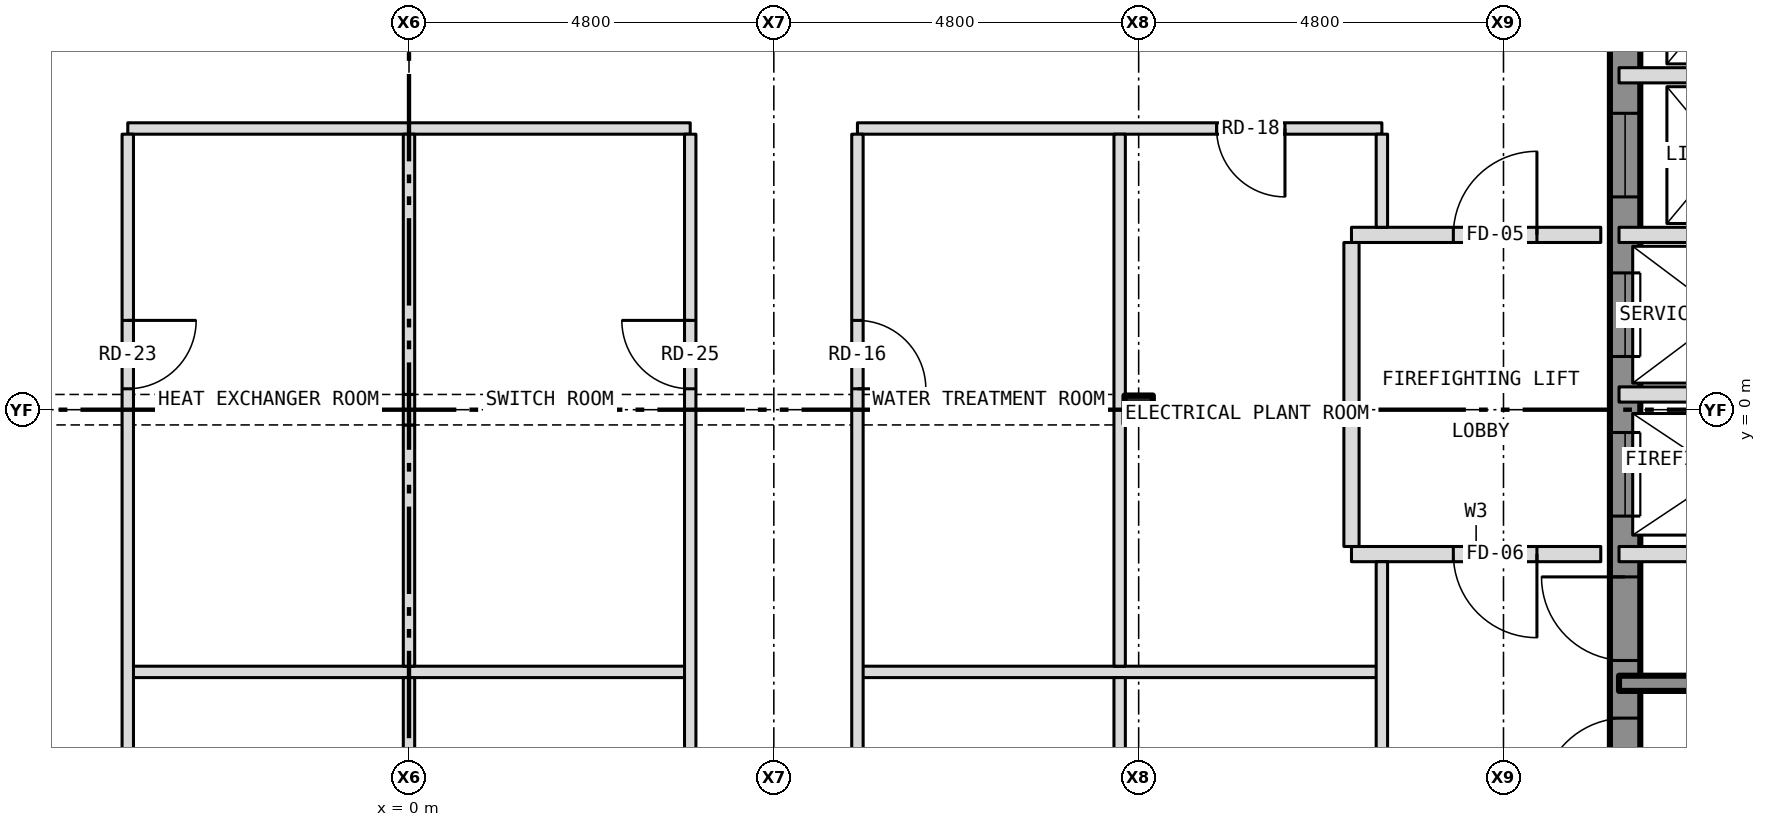
"""IFC4 building model, lengths in metres.
Left out: names, types, materials, properties, quantities, classifications, styles, units other than length and angle.
Written with IfcOpenShell. Run it as: python <this file> out.ifc"""

import sys

from ifc_helpers import new_model, si_unit, direction, frame, frame_2d, origin, origin_2d, place, context, subcontext, project, spatial, rectangle, i_section, extrude, element, fill, save


model = new_model("IFC4")
c1 = context("Model", 3, precision=1e-05, world=origin(), true_north=direction((0.0, 1.0)))
c2 = subcontext(c1, "Body", "Model", "MODEL_VIEW")
j1 = project(units=[si_unit("LENGTHUNIT", "METRE"), si_unit("PLANEANGLEUNIT", "RADIAN")], contexts=[c1])
p1 = place(None, origin())
s1 = spatial("IfcSite", under=j1, at=p1, CompositionType="ELEMENT")
p2 = place(p1, origin())
s2 = spatial("IfcBuilding", under=s1, at=p2, CompositionType="ELEMENT")
p3 = place(p2, frame((0.0, 0.0, 236.5)))
s3 = spatial("IfcBuildingStorey", under=s2, at=p3, CompositionType="ELEMENT", Elevation=236.5)
p4 = place(p3, frame((9.6, 0.0, -0.3), z_axis=(0.0, 0.0, 1.0), x_axis=(1.0, 0.0, 0.0)))
e1 = element("IfcColumn", 1, at=p4, inside=s3, PredefinedType="COLUMN", context=c2, shape_type="SweptSolid", body=[
    extrude(i_section(OverallWidth=0.373, OverallDepth=0.373, WebThickness=0.016, FlangeThickness=0.026, at=origin_2d()), origin(), (0.0, 0.0, 1.0), 4.65),
])
p5 = place(p3, frame((16.0, -10.8, 0.0), z_axis=(0.0, 0.0, 1.0), x_axis=(0.0, 1.0, 0.0)))
e2 = element("IfcWall", 2, at=p5, inside=s3, PredefinedType="SHEAR", context=c2, shape_type="SweptSolid", body=[
    extrude(rectangle(XDim=21.6, YDim=0.4, at=frame_2d((10.8, 0.0))), origin(), (0.0, 0.0, 1.0), 3.9),
])
p6 = place(p5, frame((9.4, 0.0, 0.0)))
e3 = element("IfcOpeningElement", 3, at=p6, cuts=e2, PredefinedType="OPENING", context=c2, shape_type="SweptSolid", body=[
    extrude(rectangle(XDim=1.1, YDim=2.1, at=frame_2d((0.55, 1.05))), frame((0.0, 0.212, 0.0), z_axis=(0.0, -1.0, 0.0), x_axis=(1.0, 0.0, 0.0)), (0.0, 0.0, 1.0), 0.424),
])
p7 = place(p5, frame((11.5, 0.0, 0.0)))
e4 = element("IfcOpeningElement", 4, at=p7, cuts=e2, PredefinedType="OPENING", context=c2, shape_type="SweptSolid", body=[
    extrude(rectangle(XDim=1.1, YDim=2.1, at=frame_2d((0.55, 1.05))), frame((0.0, 0.212, 0.0), z_axis=(0.0, -1.0, 0.0), x_axis=(1.0, 0.0, 0.0)), (0.0, 0.0, 1.0), 0.424),
])
p8 = place(p5, frame((13.6, 0.0, 0.0)))
e5 = element("IfcOpeningElement", 5, at=p8, cuts=e2, PredefinedType="OPENING", context=c2, shape_type="SweptSolid", body=[
    extrude(rectangle(XDim=1.1, YDim=2.1, at=frame_2d((0.55, 1.05))), frame((0.0, 0.212, 0.0), z_axis=(0.0, -1.0, 0.0), x_axis=(1.0, 0.0, 0.0)), (0.0, 0.0, 1.0), 0.424),
])
p9 = place(p5, frame((15.7, 0.0, 0.0)))
e6 = element("IfcOpeningElement", 6, at=p9, cuts=e2, PredefinedType="OPENING", context=c2, shape_type="SweptSolid", body=[
    extrude(rectangle(XDim=1.1, YDim=2.1, at=frame_2d((0.55, 1.05))), frame((0.0, 0.212, 0.0), z_axis=(0.0, -1.0, 0.0), x_axis=(1.0, 0.0, 0.0)), (0.0, 0.0, 1.0), 0.424),
])
p10 = place(p5, frame((17.8, 0.0, 0.0)))
e7 = element("IfcOpeningElement", 7, at=p10, cuts=e2, PredefinedType="OPENING", context=c2, shape_type="SweptSolid", body=[
    extrude(rectangle(XDim=1.1, YDim=2.1, at=frame_2d((0.55, 1.05))), frame((0.0, 0.212, 0.0), z_axis=(0.0, -1.0, 0.0), x_axis=(1.0, 0.0, 0.0)), (0.0, 0.0, 1.0), 0.424),
])
p11 = place(p5, frame((5.642, 0.0, 0.0)))
e8 = element("IfcOpeningElement", 8, at=p11, cuts=e2, PredefinedType="OPENING", context=c2, shape_type="SweptSolid", body=[
    extrude(rectangle(XDim=1.1, YDim=2.1, at=frame_2d((0.55, 1.05))), frame((0.0, 0.212, 0.0), z_axis=(0.0, -1.0, 0.0), x_axis=(1.0, 0.0, 0.0)), (0.0, 0.0, 1.0), 0.424),
])
p12 = place(p5, frame((7.5, 0.0, 0.0)))
e9 = element("IfcOpeningElement", 9, at=p12, cuts=e2, PredefinedType="OPENING", context=c2, shape_type="SweptSolid", body=[
    extrude(rectangle(XDim=1.1, YDim=2.1, at=frame_2d((0.55, 1.05))), frame((0.0, 0.212, 0.0), z_axis=(0.0, -1.0, 0.0), x_axis=(1.0, 0.0, 0.0)), (0.0, 0.0, 1.0), 0.424),
])
p13 = place(p5, frame((20.0, 0.0, 0.0)))
e10 = element("IfcOpeningElement", 10, at=p13, cuts=e2, PredefinedType="OPENING", context=c2, shape_type="SweptSolid", body=[
    extrude(rectangle(XDim=0.9, YDim=2.1, at=frame_2d((0.45, 1.05))), frame((0.0, 0.212, 0.0), z_axis=(0.0, -1.0, 0.0), x_axis=(1.0, 0.0, 0.0)), (0.0, 0.0, 1.0), 0.424),
])
p14 = place(p3, frame((15.92, -3.6, 0.0), z_axis=(0.0, 0.0, 1.0), x_axis=(1.0, 0.0, 0.0)))
e11 = element("IfcWall", 11, at=p14, inside=s3, PredefinedType="SHEAR", context=c2, shape_type="SweptSolid", body=[
    extrude(rectangle(XDim=4.36, YDim=0.2, at=frame_2d((2.18, 0.0))), origin(), (0.0, 0.0, 1.0), 3.9),
])
p15 = place(p3, frame((-3.7, -3.45, 0.0), z_axis=(0.0, 0.0, 1.0), x_axis=(1.0, 0.0, 0.0)))
e12 = element("IfcWall", 12, at=p15, inside=s3, PredefinedType="PARTITIONING", context=c2, shape_type="SweptSolid", body=[
    extrude(rectangle(XDim=7.4, YDim=0.15, at=frame_2d((3.7, 0.0))), origin(), (0.0, 0.0, 1.0), 4.35),
])
p16 = place(p3, frame((5.9, -3.45, 0.0), z_axis=(0.0, 0.0, 1.0), x_axis=(1.0, 0.0, 0.0)))
e13 = element("IfcWall", 13, at=p16, inside=s3, PredefinedType="PARTITIONING", context=c2, shape_type="SweptSolid", body=[
    extrude(rectangle(XDim=6.9, YDim=0.15, at=frame_2d((3.45, 0.0))), origin(), (0.0, 0.0, 1.0), 4.35),
])
p17 = place(p3, frame((12.4, -1.9, 0.0), z_axis=(0.0, 0.0, 1.0), x_axis=(1.0, 0.0, 0.0)))
e14 = element("IfcWall", 14, at=p17, inside=s3, PredefinedType="PARTITIONING", context=c2, shape_type="SweptSolid", body=[
    extrude(rectangle(XDim=3.28, YDim=0.2, at=frame_2d((1.64, 0.0))), origin(), (0.0, 0.0, 1.0), 4.35),
])
p18 = place(p17, frame((1.34, 0.0, 0.0)))
e15 = element("IfcOpeningElement", 15, at=p18, cuts=e14, PredefinedType="OPENING", context=c2, shape_type="SweptSolid", body=[
    extrude(rectangle(XDim=1.1, YDim=2.1, at=frame_2d((0.55, 1.05))), frame((0.0, 0.112, 0.0), z_axis=(0.0, -1.0, 0.0), x_axis=(1.0, 0.0, 0.0)), (0.0, 0.0, 1.0), 0.224),
])
p19 = place(p3, frame((15.92, -1.9, 0.0), z_axis=(0.0, 0.0, 1.0), x_axis=(1.0, 0.0, 0.0)))
e16 = element("IfcWall", 16, at=p19, inside=s3, PredefinedType="PARTITIONING", context=c2, shape_type="SweptSolid", body=[
    extrude(rectangle(XDim=4.36, YDim=0.2, at=frame_2d((2.18, 0.0))), origin(), (0.0, 0.0, 1.0), 3.9),
])
p20 = place(p19, frame((3.18, 0.0, 0.0)))
e17 = element("IfcOpeningElement", 17, at=p20, cuts=e16, PredefinedType="OPENING", context=c2, shape_type="SweptSolid", body=[
    extrude(rectangle(XDim=0.9, YDim=2.1, at=frame_2d((0.45, 1.05))), frame((0.0, 0.112, 0.0), z_axis=(0.0, -1.0, 0.0), x_axis=(1.0, 0.0, 0.0)), (0.0, 0.0, 1.0), 0.224),
])
p21 = place(p3, frame((15.92, 0.2, 0.0), z_axis=(0.0, 0.0, 1.0), x_axis=(1.0, 0.0, 0.0)))
e18 = element("IfcWall", 18, at=p21, inside=s3, PredefinedType="PARTITIONING", context=c2, shape_type="SweptSolid", body=[
    extrude(rectangle(XDim=2.88, YDim=0.2, at=frame_2d((1.44, 0.0))), origin(), (0.0, 0.0, 1.0), 3.9),
])
p22 = place(p3, frame((12.4, 2.3, 0.0), z_axis=(0.0, 0.0, 1.0), x_axis=(1.0, 0.0, 0.0)))
e19 = element("IfcWall", 19, at=p22, inside=s3, PredefinedType="PARTITIONING", context=c2, shape_type="SweptSolid", body=[
    extrude(rectangle(XDim=3.28, YDim=0.2, at=frame_2d((1.64, 0.0))), origin(), (0.0, 0.0, 1.0), 4.35),
])
p23 = place(p22, frame((1.34, 0.0, 0.0)))
e20 = element("IfcOpeningElement", 20, at=p23, cuts=e19, PredefinedType="OPENING", context=c2, shape_type="SweptSolid", body=[
    extrude(rectangle(XDim=1.1, YDim=2.1, at=frame_2d((0.55, 1.05))), frame((0.0, 0.112, 0.0), z_axis=(0.0, -1.0, 0.0), x_axis=(1.0, 0.0, 0.0)), (0.0, 0.0, 1.0), 0.224),
])
p24 = place(p3, frame((15.92, 2.3, 0.0), z_axis=(0.0, 0.0, 1.0), x_axis=(1.0, 0.0, 0.0)))
e21 = element("IfcWall", 21, at=p24, inside=s3, PredefinedType="PARTITIONING", context=c2, shape_type="SweptSolid", body=[
    extrude(rectangle(XDim=2.88, YDim=0.2, at=frame_2d((1.44, 0.0))), origin(), (0.0, 0.0, 1.0), 3.9),
])
p25 = place(p3, frame((-3.7, 3.7, 0.0), z_axis=(0.0, 0.0, 1.0), x_axis=(1.0, 0.0, 0.0)))
e22 = element("IfcWall", 22, at=p25, inside=s3, PredefinedType="PARTITIONING", context=c2, shape_type="SweptSolid", body=[
    extrude(rectangle(XDim=7.4, YDim=0.15, at=frame_2d((3.7, 0.0))), origin(), (0.0, 0.0, 1.0), 4.35),
])
p26 = place(p3, frame((5.9, 3.7, 0.0), z_axis=(0.0, 0.0, 1.0), x_axis=(1.0, 0.0, 0.0)))
e23 = element("IfcWall", 23, at=p26, inside=s3, PredefinedType="PARTITIONING", context=c2, shape_type="SweptSolid", body=[
    extrude(rectangle(XDim=6.9, YDim=0.15, at=frame_2d((3.45, 0.0))), origin(), (0.0, 0.0, 1.0), 4.35),
])
p27 = place(p26, frame((4.725, 0.0, 0.0)))
e24 = element("IfcOpeningElement", 24, at=p27, cuts=e23, PredefinedType="OPENING", context=c2, shape_type="SweptSolid", body=[
    extrude(rectangle(XDim=0.9, YDim=2.1, at=frame_2d((0.45, 1.05))), frame((0.0, 0.087, 0.0), z_axis=(0.0, -1.0, 0.0), x_axis=(1.0, 0.0, 0.0)), (0.0, 0.0, 1.0), 0.174),
])
p28 = place(p3, frame((15.92, 4.4, 0.0), z_axis=(0.0, 0.0, 1.0), x_axis=(1.0, 0.0, 0.0)))
e25 = element("IfcWall", 25, at=p28, inside=s3, PredefinedType="PARTITIONING", context=c2, shape_type="SweptSolid", body=[
    extrude(rectangle(XDim=2.88, YDim=0.2, at=frame_2d((1.44, 0.0))), origin(), (0.0, 0.0, 1.0), 3.9),
])
p29 = place(p3, frame((-3.7, -10.525, 0.0), z_axis=(0.0, 0.0, 1.0), x_axis=(0.0, 1.0, 0.0)))
e26 = element("IfcWall", 26, at=p29, inside=s3, PredefinedType="PARTITIONING", context=c2, shape_type="SweptSolid", body=[
    extrude(rectangle(XDim=14.15, YDim=0.15, at=frame_2d((7.075, 0.0))), origin(), (0.0, 0.0, 1.0), 4.35),
])
p30 = place(p29, frame((3.05, 0.0, 0.0)))
e27 = element("IfcOpeningElement", 27, at=p30, cuts=e26, PredefinedType="OPENING", context=c2, shape_type="SweptSolid", body=[
    extrude(rectangle(XDim=0.9, YDim=2.1, at=frame_2d((0.45, 1.05))), frame((0.0, 0.087, 0.0), z_axis=(0.0, -1.0, 0.0), x_axis=(1.0, 0.0, 0.0)), (0.0, 0.0, 1.0), 0.174),
])
p31 = place(p29, frame((10.8, 0.0, 0.0)))
e28 = element("IfcOpeningElement", 28, at=p31, cuts=e26, PredefinedType="OPENING", context=c2, shape_type="SweptSolid", body=[
    extrude(rectangle(XDim=0.9, YDim=2.1, at=frame_2d((0.45, 1.05))), frame((0.0, 0.087, 0.0), z_axis=(0.0, -1.0, 0.0), x_axis=(1.0, 0.0, 0.0)), (0.0, 0.0, 1.0), 0.174),
])
p32 = place(p3, frame((0.0, -9.399, 0.0), z_axis=(0.0, 0.0, 1.0), x_axis=(0.0, 1.0, 0.0)))
e29 = element("IfcWall", 29, at=p32, inside=s3, PredefinedType="PARTITIONING", context=c2, shape_type="SweptSolid", body=[
    extrude(rectangle(XDim=5.874, YDim=0.15, at=frame_2d((2.937, 0.0))), origin(), (0.0, 0.0, 1.0), 3.728),
])
p33 = place(p3, frame((0.0, -3.375, 0.0), z_axis=(0.0, 0.0, 1.0), x_axis=(0.0, 1.0, 0.0)))
e30 = element("IfcWall", 30, at=p33, inside=s3, PredefinedType="PARTITIONING", context=c2, shape_type="SweptSolid", body=[
    extrude(rectangle(XDim=3.174, YDim=0.15, at=frame_2d((1.587, 0.0))), origin(), (0.0, 0.0, 1.0), 3.728),
])
p34 = place(p3, frame((0.0, -0.201, 0.0), z_axis=(0.0, 0.0, 1.0), x_axis=(0.0, 1.0, 0.0)))
e31 = element("IfcWall", 31, at=p34, inside=s3, PredefinedType="PARTITIONING", context=c2, shape_type="SweptSolid", body=[
    extrude(rectangle(XDim=0.402, YDim=0.15, at=frame_2d((0.201, 0.0))), origin(), (0.0, 0.0, 1.0), 4.35),
])
p35 = place(p3, frame((0.0, 0.201, 0.0), z_axis=(0.0, 0.0, 1.0), x_axis=(0.0, 1.0, 0.0)))
e32 = element("IfcWall", 32, at=p35, inside=s3, PredefinedType="PARTITIONING", context=c2, shape_type="SweptSolid", body=[
    extrude(rectangle(XDim=3.424, YDim=0.15, at=frame_2d((1.712, 0.0))), origin(), (0.0, 0.0, 1.0), 3.728),
])
p36 = place(p3, frame((3.7, -10.525, 0.0), z_axis=(0.0, 0.0, 1.0), x_axis=(0.0, 1.0, 0.0)))
e33 = element("IfcWall", 33, at=p36, inside=s3, PredefinedType="PARTITIONING", context=c2, shape_type="SweptSolid", body=[
    extrude(rectangle(XDim=14.15, YDim=0.15, at=frame_2d((7.075, 0.0))), origin(), (0.0, 0.0, 1.0), 4.35),
])
p37 = place(p36, frame((3.05, 0.0, 0.0)))
e34 = element("IfcOpeningElement", 34, at=p37, cuts=e33, PredefinedType="OPENING", context=c2, shape_type="SweptSolid", body=[
    extrude(rectangle(XDim=0.9, YDim=2.1, at=frame_2d((0.45, 1.05))), frame((0.0, 0.087, 0.0), z_axis=(0.0, -1.0, 0.0), x_axis=(1.0, 0.0, 0.0)), (0.0, 0.0, 1.0), 0.174),
])
p38 = place(p36, frame((10.8, 0.0, 0.0)))
e35 = element("IfcOpeningElement", 35, at=p38, cuts=e33, PredefinedType="OPENING", context=c2, shape_type="SweptSolid", body=[
    extrude(rectangle(XDim=0.9, YDim=2.1, at=frame_2d((0.45, 1.05))), frame((0.0, 0.087, 0.0), z_axis=(0.0, -1.0, 0.0), x_axis=(1.0, 0.0, 0.0)), (0.0, 0.0, 1.0), 0.174),
])
p39 = place(p3, frame((5.9, -10.525, 0.0), z_axis=(0.0, 0.0, 1.0), x_axis=(0.0, 1.0, 0.0)))
e36 = element("IfcWall", 36, at=p39, inside=s3, PredefinedType="PARTITIONING", context=c2, shape_type="SweptSolid", body=[
    extrude(rectangle(XDim=14.15, YDim=0.15, at=frame_2d((7.075, 0.0))), origin(), (0.0, 0.0, 1.0), 4.35),
])
p40 = place(p39, frame((3.05, 0.0, 0.0)))
e37 = element("IfcOpeningElement", 37, at=p40, cuts=e36, PredefinedType="OPENING", context=c2, shape_type="SweptSolid", body=[
    extrude(rectangle(XDim=0.9, YDim=2.1, at=frame_2d((0.45, 1.05))), frame((0.0, 0.087, 0.0), z_axis=(0.0, -1.0, 0.0), x_axis=(1.0, 0.0, 0.0)), (0.0, 0.0, 1.0), 0.174),
])
p41 = place(p39, frame((10.8, 0.0, 0.0)))
e38 = element("IfcOpeningElement", 38, at=p41, cuts=e36, PredefinedType="OPENING", context=c2, shape_type="SweptSolid", body=[
    extrude(rectangle(XDim=0.9, YDim=2.1, at=frame_2d((0.45, 1.05))), frame((0.0, 0.087, 0.0), z_axis=(0.0, -1.0, 0.0), x_axis=(1.0, 0.0, 0.0)), (0.0, 0.0, 1.0), 0.174),
])
for number, where, z_axis, x_axis in (
    (39, (9.35, -10.525, 0.0), (0.0, 0.0, 1.0), (0.0, 1.0, 0.0)),
    (40, (9.35, -3.375, 0.0), (0.0, 0.0, 1.0), (0.0, 1.0, 0.0)),
):
    element("IfcWall", number, at=place(p3, frame(where, z_axis=z_axis, x_axis=x_axis)), inside=s3, PredefinedType="PARTITIONING", context=c2, shape_type="SweptSolid", body=[
        extrude(rectangle(XDim=7.0, YDim=0.15, at=frame_2d((3.5, 0.0))), origin(), (0.0, 0.0, 1.0), 4.35),
    ])
p42 = place(p3, frame((12.4, -1.8, 0.0), z_axis=(0.0, 0.0, 1.0), x_axis=(0.0, 1.0, 0.0)))
e41 = element("IfcWall", 41, at=p42, inside=s3, PredefinedType="PARTITIONING", context=c2, shape_type="SweptSolid", body=[
    extrude(rectangle(XDim=4.0, YDim=0.2, at=frame_2d((2.0, 0.0))), origin(), (0.0, 0.0, 1.0), 4.35),
])
p43 = place(p3, frame((12.8, -10.525, 0.0), z_axis=(0.0, 0.0, 1.0), x_axis=(0.0, 1.0, 0.0)))
e42 = element("IfcWall", 42, at=p43, inside=s3, PredefinedType="PARTITIONING", context=c2, shape_type="SweptSolid", body=[
    extrude(rectangle(XDim=8.525, YDim=0.15, at=frame_2d((4.262, 0.0))), origin(), (0.0, 0.0, 1.0), 4.35),
])
p44 = place(p43, frame((3.05, 0.0, 0.0)))
e43 = element("IfcOpeningElement", 43, at=p44, cuts=e42, PredefinedType="OPENING", context=c2, shape_type="SweptSolid", body=[
    extrude(rectangle(XDim=0.9, YDim=2.1, at=frame_2d((0.45, 1.05))), frame((0.0, 0.087, 0.0), z_axis=(0.0, -1.0, 0.0), x_axis=(1.0, 0.0, 0.0)), (0.0, 0.0, 1.0), 0.174),
])
p45 = place(p3, frame((12.8, 2.4, 0.0), z_axis=(0.0, 0.0, 1.0), x_axis=(0.0, 1.0, 0.0)))
e44 = element("IfcWall", 44, at=p45, inside=s3, PredefinedType="PARTITIONING", context=c2, shape_type="SweptSolid", body=[
    extrude(rectangle(XDim=1.225, YDim=0.15, at=frame_2d((0.613, 0.0))), origin(), (0.0, 0.0, 1.0), 4.35),
])
p46 = place(p6, origin())
e45 = element("IfcDoor", 45, at=p46, inside=s3, OperationType="SLIDING_TO_LEFT", PredefinedType="DOOR", context=c2, shape_type="SweptSolid", body=[
    extrude(rectangle(XDim=1.1, YDim=2.1, at=frame_2d((0.55, 1.05))), frame((0.0, 0.025, 0.0), z_axis=(0.0, -1.0, 0.0), x_axis=(1.0, 0.0, 0.0)), (0.0, 0.0, 1.0), 0.05),
])
fill(e3, e45)
p47 = place(p7, origin())
e46 = element("IfcDoor", 46, at=p47, inside=s3, OperationType="SLIDING_TO_LEFT", PredefinedType="DOOR", context=c2, shape_type="SweptSolid", body=[
    extrude(rectangle(XDim=1.1, YDim=2.1, at=frame_2d((0.55, 1.05))), frame((0.0, 0.025, 0.0), z_axis=(0.0, -1.0, 0.0), x_axis=(1.0, 0.0, 0.0)), (0.0, 0.0, 1.0), 0.05),
])
fill(e4, e46)
p48 = place(p8, origin())
e47 = element("IfcDoor", 47, at=p48, inside=s3, OperationType="SLIDING_TO_LEFT", PredefinedType="DOOR", context=c2, shape_type="SweptSolid", body=[
    extrude(rectangle(XDim=1.1, YDim=2.1, at=frame_2d((0.55, 1.05))), frame((0.0, 0.025, 0.0), z_axis=(0.0, -1.0, 0.0), x_axis=(1.0, 0.0, 0.0)), (0.0, 0.0, 1.0), 0.05),
])
fill(e5, e47)
p49 = place(p11, origin())
e48 = element("IfcDoor", 48, at=p49, inside=s3, OperationType="SINGLE_SWING_LEFT", PredefinedType="DOOR", context=c2, shape_type="SweptSolid", body=[
    extrude(rectangle(XDim=1.1, YDim=2.1, at=frame_2d((0.55, 1.05))), frame((0.0, 0.025, 0.0), z_axis=(0.0, -1.0, 0.0), x_axis=(1.0, 0.0, 0.0)), (0.0, 0.0, 1.0), 0.05),
])
fill(e8, e48)
p50 = place(p12, origin())
e49 = element("IfcDoor", 49, at=p50, inside=s3, OperationType="SINGLE_SWING_RIGHT", PredefinedType="DOOR", context=c2, shape_type="SweptSolid", body=[
    extrude(rectangle(XDim=1.1, YDim=2.1, at=frame_2d((0.55, 1.05))), frame((0.0, 0.025, 0.0), z_axis=(0.0, -1.0, 0.0), x_axis=(1.0, 0.0, 0.0)), (0.0, 0.0, 1.0), 0.05),
])
fill(e9, e49)
p51 = place(p23, origin())
e50 = element("IfcDoor", 50, at=p51, inside=s3, OperationType="SINGLE_SWING_RIGHT", PredefinedType="DOOR", context=c2, shape_type="SweptSolid", body=[
    extrude(rectangle(XDim=1.1, YDim=2.1, at=frame_2d((0.55, 1.05))), frame((0.0, 0.025, 0.0), z_axis=(0.0, -1.0, 0.0), x_axis=(1.0, 0.0, 0.0)), (0.0, 0.0, 1.0), 0.05),
])
fill(e20, e50)
p52 = place(p18, origin())
e51 = element("IfcDoor", 51, at=p52, inside=s3, OperationType="SINGLE_SWING_RIGHT", PredefinedType="DOOR", context=c2, shape_type="SweptSolid", body=[
    extrude(rectangle(XDim=1.1, YDim=2.1, at=frame_2d((0.55, 1.05))), frame((0.0, 0.025, 0.0), z_axis=(0.0, -1.0, 0.0), x_axis=(1.0, 0.0, 0.0)), (0.0, 0.0, 1.0), 0.05),
])
fill(e15, e51)
p53 = place(p41, origin())
e52 = element("IfcDoor", 52, at=p53, inside=s3, OperationType="SINGLE_SWING_LEFT", PredefinedType="DOOR", context=c2, shape_type="SweptSolid", body=[
    extrude(rectangle(XDim=0.9, YDim=2.1, at=frame_2d((0.45, 1.05))), frame((0.0, 0.025, 0.0), z_axis=(0.0, -1.0, 0.0), x_axis=(1.0, 0.0, 0.0)), (0.0, 0.0, 1.0), 0.05),
])
fill(e38, e52)
p54 = place(p27, origin())
e53 = element("IfcDoor", 53, at=p54, inside=s3, OperationType="SINGLE_SWING_RIGHT", PredefinedType="DOOR", context=c2, shape_type="SweptSolid", body=[
    extrude(rectangle(XDim=0.9, YDim=2.1, at=frame_2d((0.45, 1.05))), frame((0.0, 0.025, 0.0), z_axis=(0.0, -1.0, 0.0), x_axis=(1.0, 0.0, 0.0)), (0.0, 0.0, 1.0), 0.05),
])
fill(e24, e53)
p55 = place(p31, origin())
e54 = element("IfcDoor", 54, at=p55, inside=s3, OperationType="SINGLE_SWING_RIGHT", PredefinedType="DOOR", context=c2, shape_type="SweptSolid", body=[
    extrude(rectangle(XDim=0.9, YDim=2.1, at=frame_2d((0.45, 1.05))), frame((0.0, 0.025, 0.0), z_axis=(0.0, -1.0, 0.0), x_axis=(1.0, 0.0, 0.0)), (0.0, 0.0, 1.0), 0.05),
])
fill(e28, e54)
p56 = place(p38, origin())
e55 = element("IfcDoor", 55, at=p56, inside=s3, OperationType="SINGLE_SWING_RIGHT", PredefinedType="DOOR", context=c2, shape_type="SweptSolid", body=[
    extrude(rectangle(XDim=0.9, YDim=2.1, at=frame_2d((0.45, 1.05))), frame((0.0, 0.025, 0.0), z_axis=(0.0, -1.0, 0.0), x_axis=(1.0, 0.0, 0.0)), (0.0, 0.0, 1.0), 0.05),
])
fill(e35, e55)
save(model, sys.argv[1])
